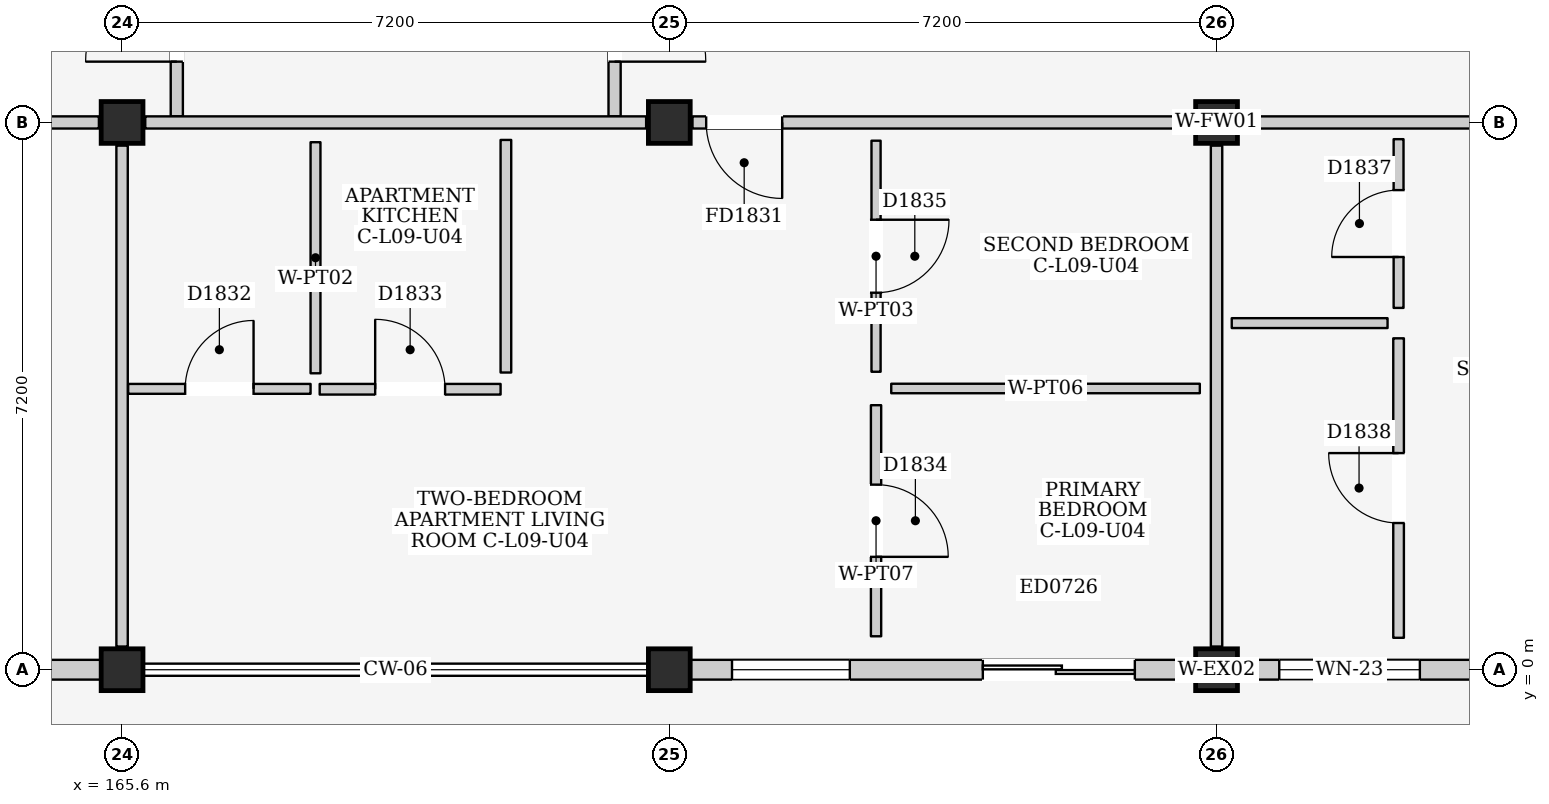
"""IFC4 building model, lengths in metres.
Left out: names, types, materials, properties, quantities, classifications, styles, units other than length and angle.
Written with IfcOpenShell. Run it as: python <this file> out.ifc"""

import sys

from ifc_helpers import new_model, si_unit, direction, frame, frame_2d, origin, origin_2d, place, context, subcontext, project, spatial, rectangle, extrude, element, fill, save


model = new_model("IFC4")
c1 = context("Model", 3, precision=1e-05, world=origin(), true_north=direction((0.0, 1.0)))
c2 = subcontext(c1, "Body", "Model", "MODEL_VIEW")
j1 = project(units=[si_unit("LENGTHUNIT", "METRE"), si_unit("PLANEANGLEUNIT", "RADIAN")], contexts=[c1])
p1 = place(None, origin())
s1 = spatial("IfcSite", under=j1, at=p1, CompositionType="ELEMENT")
p2 = place(p1, origin())
s2 = spatial("IfcBuilding", under=s1, at=p2, CompositionType="ELEMENT")
p3 = place(p2, frame((0.0, 0.0, 31.5)))
s3 = spatial("IfcBuildingStorey", under=s2, at=p3, CompositionType="ELEMENT", Elevation=31.5)
for number, where, z_axis, x_axis in (
    (1, (165.6, 0.0, 0.0), (0.0, 0.0, 1.0), (1.0, 0.0, 0.0)),
    (2, (165.6, 7.2, 0.0), (0.0, 0.0, 1.0), (1.0, 0.0, 0.0)),
    (3, (172.8, 0.0, 0.0), (0.0, 0.0, 1.0), (1.0, 0.0, 0.0)),
    (4, (172.8, 7.2, 0.0), (0.0, 0.0, 1.0), (1.0, 0.0, 0.0)),
    (5, (180.0, 0.0, 0.0), (0.0, 0.0, 1.0), (1.0, 0.0, 0.0)),
    (6, (180.0, 7.2, 0.0), (0.0, 0.0, 1.0), (1.0, 0.0, 0.0)),
):
    element("IfcColumn", number, at=place(p3, frame(where, z_axis=z_axis, x_axis=x_axis)), inside=s3, PredefinedType="COLUMN", context=c2, shape_type="SweptSolid", body=[
        extrude(rectangle(XDim=0.55, YDim=0.55, at=origin_2d()), origin(), (0.0, 0.0, 1.0), 3.3),
    ])
p4 = place(p3, frame((158.675, 0.0, 0.0), z_axis=(0.0, 0.0, 1.0), x_axis=(1.0, 0.0, 0.0)))
e7 = element("IfcWall", 7, at=p4, inside=s3, PredefinedType="ELEMENTEDWALL", context=c2, shape_type="SweptSolid", body=[
    extrude(rectangle(XDim=6.65, YDim=0.26, at=frame_2d((3.325, 0.0))), origin(), (0.0, 0.0, 1.0), 2.615),
])
p5 = place(p4, frame((3.85, 0.0, 0.0)))
e8 = element("IfcOpeningElement", 8, at=p5, cuts=e7, PredefinedType="OPENING", context=c2, shape_type="SweptSolid", body=[
    extrude(rectangle(XDim=1.5, YDim=2.12, at=frame_2d((0.75, 1.06))), frame((0.0, 0.145, 0.0), z_axis=(0.0, -1.0, 0.0), x_axis=(1.0, 0.0, 0.0)), (0.0, 0.0, 1.0), 0.29),
])
p6 = place(p4, frame((0.55, 0.0, 0.9)))
e9 = element("IfcOpeningElement", 9, at=p6, cuts=e7, PredefinedType="OPENING", context=c2, shape_type="SweptSolid", body=[
    extrude(rectangle(XDim=1.15, YDim=1.15, at=frame_2d((0.575, 0.575))), frame((0.0, 0.145, 0.0), z_axis=(0.0, -1.0, 0.0), x_axis=(1.0, 0.0, 0.0)), (0.0, 0.0, 1.0), 0.29),
])
p7 = place(p3, frame((173.075, 0.0, 0.0), z_axis=(0.0, 0.0, 1.0), x_axis=(1.0, 0.0, 0.0)))
e10 = element("IfcWall", 10, at=p7, inside=s3, PredefinedType="ELEMENTEDWALL", context=c2, shape_type="SweptSolid", body=[
    extrude(rectangle(XDim=6.65, YDim=0.26, at=frame_2d((3.325, 0.0))), origin(), (0.0, 0.0, 1.0), 2.615),
])
p8 = place(p7, frame((3.85, 0.0, 0.0)))
e11 = element("IfcOpeningElement", 11, at=p8, cuts=e10, PredefinedType="OPENING", context=c2, shape_type="SweptSolid", body=[
    extrude(rectangle(XDim=2.0, YDim=2.12, at=frame_2d((1.0, 1.06))), frame((0.0, 0.145, 0.0), z_axis=(0.0, -1.0, 0.0), x_axis=(1.0, 0.0, 0.0)), (0.0, 0.0, 1.0), 0.29),
])
p9 = place(p7, frame((0.55, 0.0, 0.9)))
e12 = element("IfcOpeningElement", 12, at=p9, cuts=e10, PredefinedType="OPENING", context=c2, shape_type="SweptSolid", body=[
    extrude(rectangle(XDim=1.55, YDim=1.45, at=frame_2d((0.775, 0.725))), frame((0.0, 0.145, 0.0), z_axis=(0.0, -1.0, 0.0), x_axis=(1.0, 0.0, 0.0)), (0.0, 0.0, 1.0), 0.29),
])
p10 = place(p3, frame((180.275, 0.0, 0.0), z_axis=(0.0, 0.0, 1.0), x_axis=(1.0, 0.0, 0.0)))
e13 = element("IfcWall", 13, at=p10, inside=s3, PredefinedType="ELEMENTEDWALL", context=c2, shape_type="SweptSolid", body=[
    extrude(rectangle(XDim=6.65, YDim=0.26, at=frame_2d((3.325, 0.0))), origin(), (0.0, 0.0, 1.0), 2.615),
])
p11 = place(p10, frame((3.85, 0.0, 0.0)))
e14 = element("IfcOpeningElement", 14, at=p11, cuts=e13, PredefinedType="OPENING", context=c2, shape_type="SweptSolid", body=[
    extrude(rectangle(XDim=1.4, YDim=2.1, at=frame_2d((0.7, 1.05))), frame((0.0, 0.145, 0.0), z_axis=(0.0, -1.0, 0.0), x_axis=(1.0, 0.0, 0.0)), (0.0, 0.0, 1.0), 0.29),
])
p12 = place(p10, frame((0.55, 0.0, 0.9)))
e15 = element("IfcOpeningElement", 15, at=p12, cuts=e13, PredefinedType="OPENING", context=c2, shape_type="SweptSolid", body=[
    extrude(rectangle(XDim=1.85, YDim=1.4, at=frame_2d((0.925, 0.7))), frame((0.0, 0.145, 0.0), z_axis=(0.0, -1.0, 0.0), x_axis=(1.0, 0.0, 0.0)), (0.0, 0.0, 1.0), 0.29),
])
p13 = place(p3, frame((166.32, 7.28, 0.0), z_axis=(0.0, 0.0, 1.0), x_axis=(0.0, 1.0, 0.0)))
e16 = element("IfcWall", 16, at=p13, inside=s3, PredefinedType="PARTITIONING", context=c2, shape_type="SweptSolid", body=[
    extrude(rectangle(XDim=4.32, YDim=0.16, at=frame_2d((2.16, 0.0))), origin(), (0.0, 0.0, 1.0), 3.08),
])
p14 = place(p13, frame((0.72, 0.0, 0.0)))
e17 = element("IfcOpeningElement", 17, at=p14, cuts=e16, PredefinedType="OPENING", context=c2, shape_type="SweptSolid", body=[
    extrude(rectangle(XDim=1.2, YDim=2.2, at=frame_2d((0.6, 1.1))), frame((0.0, 0.095, 0.0), z_axis=(0.0, -1.0, 0.0), x_axis=(1.0, 0.0, 0.0)), (0.0, 0.0, 1.0), 0.19),
])
p15 = place(p3, frame((172.08, 7.28, 0.0), z_axis=(0.0, 0.0, 1.0), x_axis=(0.0, 1.0, 0.0)))
e18 = element("IfcWall", 18, at=p15, inside=s3, PredefinedType="PARTITIONING", context=c2, shape_type="SweptSolid", body=[
    extrude(rectangle(XDim=4.32, YDim=0.16, at=frame_2d((2.16, 0.0))), origin(), (0.0, 0.0, 1.0), 3.08),
])
p16 = place(p15, frame((0.72, 0.0, 0.0)))
e19 = element("IfcOpeningElement", 19, at=p16, cuts=e18, PredefinedType="OPENING", context=c2, shape_type="SweptSolid", body=[
    extrude(rectangle(XDim=1.2, YDim=2.2, at=frame_2d((0.6, 1.1))), frame((0.0, 0.095, 0.0), z_axis=(0.0, -1.0, 0.0), x_axis=(1.0, 0.0, 0.0)), (0.0, 0.0, 1.0), 0.19),
])
p17 = place(p3, frame((158.705, 7.2, 0.0), z_axis=(0.0, 0.0, 1.0), x_axis=(1.0, 0.0, 0.0)))
e20 = element("IfcWall", 20, at=p17, inside=s3, PredefinedType="PARTITIONING", context=c2, shape_type="SweptSolid", body=[
    extrude(rectangle(XDim=6.59, YDim=0.16, at=frame_2d((3.295, 0.0))), origin(), (0.0, 0.0, 1.0), 2.465),
])
p18 = place(p17, frame((4.145, 0.0, 0.0)))
e21 = element("IfcOpeningElement", 21, at=p18, cuts=e20, PredefinedType="OPENING", context=c2, shape_type="SweptSolid", body=[
    extrude(rectangle(XDim=1.0, YDim=2.15, at=frame_2d((0.5, 1.075))), frame((0.0, 0.095, 0.0), z_axis=(0.0, -1.0, 0.0), x_axis=(1.0, 0.0, 0.0)), (0.0, 0.0, 1.0), 0.19),
])
p19 = place(p3, frame((165.6, 0.305, 0.0), z_axis=(0.0, 0.0, 1.0), x_axis=(0.0, 1.0, 0.0)))
e22 = element("IfcWall", 22, at=p19, inside=s3, PredefinedType="PARTITIONING", context=c2, shape_type="SweptSolid", body=[
    extrude(rectangle(XDim=6.59, YDim=0.15, at=frame_2d((3.295, 0.0))), origin(), (0.0, 0.0, 1.0), 2.565),
])
p20 = place(p3, frame((165.905, 7.2, 0.0), z_axis=(0.0, 0.0, 1.0), x_axis=(1.0, 0.0, 0.0)))
e23 = element("IfcWall", 23, at=p20, inside=s3, PredefinedType="PARTITIONING", context=c2, shape_type="SweptSolid", body=[
    extrude(rectangle(XDim=6.59, YDim=0.16, at=frame_2d((3.295, 0.0))), origin(), (0.0, 0.0, 1.0), 2.465),
])
p21 = place(p3, frame((173.105, 7.2, 0.0), z_axis=(0.0, 0.0, 1.0), x_axis=(1.0, 0.0, 0.0)))
e24 = element("IfcWall", 24, at=p21, inside=s3, PredefinedType="PARTITIONING", context=c2, shape_type="SweptSolid", body=[
    extrude(rectangle(XDim=6.59, YDim=0.16, at=frame_2d((3.295, 0.0))), origin(), (0.0, 0.0, 1.0), 2.465),
])
p22 = place(p21, frame((0.18, 0.0, 0.0)))
e25 = element("IfcOpeningElement", 25, at=p22, cuts=e24, PredefinedType="OPENING", context=c2, shape_type="SweptSolid", body=[
    extrude(rectangle(XDim=1.0, YDim=2.15, at=frame_2d((0.5, 1.075))), frame((0.0, 0.095, 0.0), z_axis=(0.0, -1.0, 0.0), x_axis=(1.0, 0.0, 0.0)), (0.0, 0.0, 1.0), 0.19),
])
p23 = place(p3, frame((180.0, 0.305, 0.0), z_axis=(0.0, 0.0, 1.0), x_axis=(0.0, 1.0, 0.0)))
e26 = element("IfcWall", 26, at=p23, inside=s3, PredefinedType="PARTITIONING", context=c2, shape_type="SweptSolid", body=[
    extrude(rectangle(XDim=6.59, YDim=0.15, at=frame_2d((3.295, 0.0))), origin(), (0.0, 0.0, 1.0), 2.565),
])
p24 = place(p3, frame((165.68, 3.695, 0.0), z_axis=(0.0, 0.0, 1.0), x_axis=(1.0, 0.0, 0.0)))
e27 = element("IfcWall", 27, at=p24, inside=s3, PredefinedType="PARTITIONING", context=c2, shape_type="SweptSolid", body=[
    extrude(rectangle(XDim=2.4, YDim=0.13, at=frame_2d((1.2, 0.0))), origin(), (0.0, 0.0, 1.0), 3.08),
])
p25 = place(p24, frame((0.75, 0.0, 0.0)))
e28 = element("IfcOpeningElement", 28, at=p25, cuts=e27, PredefinedType="OPENING", context=c2, shape_type="SweptSolid", body=[
    extrude(rectangle(XDim=0.9, YDim=2.1, at=frame_2d((0.45, 1.05))), frame((0.0, 0.08, 0.0), z_axis=(0.0, -1.0, 0.0), x_axis=(1.0, 0.0, 0.0)), (0.0, 0.0, 1.0), 0.16),
])
p26 = place(p3, frame((168.145, 3.9, 0.0), z_axis=(0.0, 0.0, 1.0), x_axis=(0.0, 1.0, 0.0)))
e29 = element("IfcWall", 29, at=p26, inside=s3, PredefinedType="PARTITIONING", context=c2, shape_type="SweptSolid", body=[
    extrude(rectangle(XDim=3.04, YDim=0.13, at=frame_2d((1.52, 0.0))), origin(), (0.0, 0.0, 1.0), 3.08),
])
p27 = place(p3, frame((168.2, 3.69, 0.0), z_axis=(0.0, 0.0, 1.0), x_axis=(1.0, 0.0, 0.0)))
e30 = element("IfcWall", 30, at=p27, inside=s3, PredefinedType="PARTITIONING", context=c2, shape_type="SweptSolid", body=[
    extrude(rectangle(XDim=2.38, YDim=0.14, at=frame_2d((1.19, 0.0))), origin(), (0.0, 0.0, 1.0), 3.08),
])
p28 = place(p27, frame((0.73, 0.0, 0.0)))
e31 = element("IfcOpeningElement", 31, at=p28, cuts=e30, PredefinedType="OPENING", context=c2, shape_type="SweptSolid", body=[
    extrude(rectangle(XDim=0.92, YDim=2.1, at=frame_2d((0.46, 1.05))), frame((0.0, 0.085, 0.0), z_axis=(0.0, -1.0, 0.0), x_axis=(1.0, 0.0, 0.0)), (0.0, 0.0, 1.0), 0.17),
])
p29 = place(p3, frame((170.65, 3.91, 0.0), z_axis=(0.0, 0.0, 1.0), x_axis=(0.0, 1.0, 0.0)))
e32 = element("IfcWall", 32, at=p29, inside=s3, PredefinedType="PARTITIONING", context=c2, shape_type="SweptSolid", body=[
    extrude(rectangle(XDim=3.06, YDim=0.14, at=frame_2d((1.53, 0.0))), origin(), (0.0, 0.0, 1.0), 3.08),
])
p30 = place(p3, frame((175.52, 0.44, 0.0), z_axis=(0.0, 0.0, 1.0), x_axis=(0.0, 1.0, 0.0)))
e33 = element("IfcWall", 33, at=p30, inside=s3, PredefinedType="PARTITIONING", context=c2, shape_type="SweptSolid", body=[
    extrude(rectangle(XDim=3.04, YDim=0.135, at=frame_2d((1.52, 0.0))), origin(), (0.0, 0.0, 1.0), 3.08),
])
p31 = place(p30, frame((1.045, 0.0, 0.0)))
e34 = element("IfcOpeningElement", 34, at=p31, cuts=e33, PredefinedType="OPENING", context=c2, shape_type="SweptSolid", body=[
    extrude(rectangle(XDim=0.95, YDim=2.15, at=frame_2d((0.475, 1.075))), frame((0.0, 0.083, 0.0), z_axis=(0.0, -1.0, 0.0), x_axis=(1.0, 0.0, 0.0)), (0.0, 0.0, 1.0), 0.165),
])
p32 = place(p3, frame((175.72, 3.7, 0.0), z_axis=(0.0, 0.0, 1.0), x_axis=(1.0, 0.0, 0.0)))
e35 = element("IfcWall", 35, at=p32, inside=s3, PredefinedType="PARTITIONING", context=c2, shape_type="SweptSolid", body=[
    extrude(rectangle(XDim=4.06, YDim=0.125, at=frame_2d((2.03, 0.0))), origin(), (0.0, 0.0, 1.0), 3.08),
])
p33 = place(p3, frame((175.52, 3.92, 0.0), z_axis=(0.0, 0.0, 1.0), x_axis=(0.0, 1.0, 0.0)))
e36 = element("IfcWall", 36, at=p33, inside=s3, PredefinedType="PARTITIONING", context=c2, shape_type="SweptSolid", body=[
    extrude(rectangle(XDim=3.04, YDim=0.12, at=frame_2d((1.52, 0.0))), origin(), (0.0, 0.0, 1.0), 3.08),
])
p34 = place(p33, frame((1.04, 0.0, 0.0)))
e37 = element("IfcOpeningElement", 37, at=p34, cuts=e36, PredefinedType="OPENING", context=c2, shape_type="SweptSolid", body=[
    extrude(rectangle(XDim=0.96, YDim=2.15, at=frame_2d((0.48, 1.075))), frame((0.0, 0.075, 0.0), z_axis=(0.0, -1.0, 0.0), x_axis=(1.0, 0.0, 0.0)), (0.0, 0.0, 1.0), 0.15),
])
p35 = place(p3, frame((180.305, 7.2, 0.0), z_axis=(0.0, 0.0, 1.0), x_axis=(1.0, 0.0, 0.0)))
e38 = element("IfcWall", 38, at=p35, inside=s3, PredefinedType="PARTITIONING", context=c2, shape_type="SweptSolid", body=[
    extrude(rectangle(XDim=6.59, YDim=0.16, at=frame_2d((3.295, 0.0))), origin(), (0.0, 0.0, 1.0), 2.465),
])
p36 = place(p35, frame((4.145, 0.0, 0.0)))
e39 = element("IfcOpeningElement", 39, at=p36, cuts=e38, PredefinedType="OPENING", context=c2, shape_type="SweptSolid", body=[
    extrude(rectangle(XDim=1.0, YDim=2.15, at=frame_2d((0.5, 1.075))), frame((0.0, 0.095, 0.0), z_axis=(0.0, -1.0, 0.0), x_axis=(1.0, 0.0, 0.0)), (0.0, 0.0, 1.0), 0.19),
])
p37 = place(p3, frame((180.2, 4.56, 0.0), z_axis=(0.0, 0.0, 1.0), x_axis=(1.0, 0.0, 0.0)))
e40 = element("IfcWall", 40, at=p37, inside=s3, PredefinedType="PARTITIONING", context=c2, shape_type="SweptSolid", body=[
    extrude(rectangle(XDim=2.05, YDim=0.13, at=frame_2d((1.025, 0.0))), origin(), (0.0, 0.0, 1.0), 3.08),
])
p38 = place(p3, frame((182.395, 4.76, 0.0), z_axis=(0.0, 0.0, 1.0), x_axis=(0.0, 1.0, 0.0)))
e41 = element("IfcWall", 41, at=p38, inside=s3, PredefinedType="PARTITIONING", context=c2, shape_type="SweptSolid", body=[
    extrude(rectangle(XDim=2.22, YDim=0.13, at=frame_2d((1.11, 0.0))), origin(), (0.0, 0.0, 1.0), 3.08),
])
p39 = place(p38, frame((0.67, 0.0, 0.0)))
e42 = element("IfcOpeningElement", 42, at=p39, cuts=e41, PredefinedType="OPENING", context=c2, shape_type="SweptSolid", body=[
    extrude(rectangle(XDim=0.88, YDim=2.1, at=frame_2d((0.44, 1.05))), frame((0.0, 0.08, 0.0), z_axis=(0.0, -1.0, 0.0), x_axis=(1.0, 0.0, 0.0)), (0.0, 0.0, 1.0), 0.16),
])
p40 = place(p3, frame((182.395, 0.42, 0.0), z_axis=(0.0, 0.0, 1.0), x_axis=(0.0, 1.0, 0.0)))
e43 = element("IfcWall", 43, at=p40, inside=s3, PredefinedType="PARTITIONING", context=c2, shape_type="SweptSolid", body=[
    extrude(rectangle(XDim=3.94, YDim=0.14, at=frame_2d((1.97, 0.0))), origin(), (0.0, 0.0, 1.0), 3.08),
])
p41 = place(p40, frame((1.51, 0.0, 0.0)))
e44 = element("IfcOpeningElement", 44, at=p41, cuts=e43, PredefinedType="OPENING", context=c2, shape_type="SweptSolid", body=[
    extrude(rectangle(XDim=0.92, YDim=2.1, at=frame_2d((0.46, 1.05))), frame((0.0, 0.085, 0.0), z_axis=(0.0, -1.0, 0.0), x_axis=(1.0, 0.0, 0.0)), (0.0, 0.0, 1.0), 0.17),
])
p42 = place(p8, frame((2.0, 0.0, 0.0), z_axis=(0.0, 0.0, 1.0), x_axis=(-1.0, 0.0, 0.0)))
e45 = element("IfcDoor", 45, at=p42, inside=s3, OperationType="DOUBLE_DOOR_SLIDING", PredefinedType="DOOR", context=c2, shape_type="SweptSolid", body=[
    extrude(rectangle(XDim=2.0, YDim=2.12, at=frame_2d((1.0, 1.06))), frame((0.0, 0.025, 0.0), z_axis=(0.0, -1.0, 0.0), x_axis=(1.0, 0.0, 0.0)), (0.0, 0.0, 1.0), 0.05),
])
fill(e11, e45)
p43 = place(p9, origin())
e46 = element("IfcWindow", 46, at=p43, inside=s3, PartitioningType="DOUBLE_PANEL_VERTICAL", PredefinedType="WINDOW", context=c2, shape_type="SweptSolid", body=[
    extrude(rectangle(XDim=1.55, YDim=1.45, at=frame_2d((0.775, 0.725))), frame((0.0, 0.03, 0.0), z_axis=(0.0, -1.0, 0.0), x_axis=(1.0, 0.0, 0.0)), (0.0, 0.0, 1.0), 0.06),
])
fill(e12, e46)
p44 = place(p12, origin())
e47 = element("IfcWindow", 47, at=p44, inside=s3, PartitioningType="DOUBLE_PANEL_VERTICAL", PredefinedType="WINDOW", context=c2, shape_type="SweptSolid", body=[
    extrude(rectangle(XDim=1.85, YDim=1.4, at=frame_2d((0.925, 0.7))), frame((0.0, 0.03, 0.0), z_axis=(0.0, -1.0, 0.0), x_axis=(1.0, 0.0, 0.0)), (0.0, 0.0, 1.0), 0.06),
])
fill(e15, e47)
p45 = place(p14, origin())
e48 = element("IfcDoor", 48, at=p45, inside=s3, OperationType="SINGLE_SWING_LEFT", PredefinedType="DOOR", context=c2, shape_type="SweptSolid", body=[
    extrude(rectangle(XDim=1.2, YDim=2.2, at=frame_2d((0.6, 1.1))), frame((0.0, 0.025, 0.0), z_axis=(0.0, -1.0, 0.0), x_axis=(1.0, 0.0, 0.0)), (0.0, 0.0, 1.0), 0.05),
])
fill(e17, e48)
p46 = place(p16, frame((1.2, 0.0, 0.0), z_axis=(0.0, 0.0, 1.0), x_axis=(-1.0, 0.0, 0.0)))
e49 = element("IfcDoor", 49, at=p46, inside=s3, OperationType="SINGLE_SWING_RIGHT", PredefinedType="DOOR", context=c2, shape_type="SweptSolid", body=[
    extrude(rectangle(XDim=1.2, YDim=2.2, at=frame_2d((0.6, 1.1))), frame((0.0, 0.025, 0.0), z_axis=(0.0, -1.0, 0.0), x_axis=(1.0, 0.0, 0.0)), (0.0, 0.0, 1.0), 0.05),
])
fill(e19, e49)
p47 = place(p22, frame((1.0, 0.0, 0.0), z_axis=(0.0, 0.0, 1.0), x_axis=(-1.0, 0.0, 0.0)))
e50 = element("IfcDoor", 50, at=p47, inside=s3, OperationType="SINGLE_SWING_LEFT", PredefinedType="DOOR", context=c2, shape_type="SweptSolid", body=[
    extrude(rectangle(XDim=1.0, YDim=2.15, at=frame_2d((0.5, 1.075))), frame((0.0, 0.025, 0.0), z_axis=(0.0, -1.0, 0.0), x_axis=(1.0, 0.0, 0.0)), (0.0, 0.0, 1.0), 0.05),
])
fill(e25, e50)
p48 = place(p25, origin())
e51 = element("IfcDoor", 51, at=p48, inside=s3, OperationType="SINGLE_SWING_RIGHT", PredefinedType="DOOR", context=c2, shape_type="SweptSolid", body=[
    extrude(rectangle(XDim=0.9, YDim=2.1, at=frame_2d((0.45, 1.05))), frame((0.0, 0.025, 0.0), z_axis=(0.0, -1.0, 0.0), x_axis=(1.0, 0.0, 0.0)), (0.0, 0.0, 1.0), 0.05),
])
fill(e28, e51)
p49 = place(p28, origin())
e52 = element("IfcDoor", 52, at=p49, inside=s3, OperationType="SINGLE_SWING_LEFT", PredefinedType="DOOR", context=c2, shape_type="SweptSolid", body=[
    extrude(rectangle(XDim=0.92, YDim=2.1, at=frame_2d((0.46, 1.05))), frame((0.0, 0.025, 0.0), z_axis=(0.0, -1.0, 0.0), x_axis=(1.0, 0.0, 0.0)), (0.0, 0.0, 1.0), 0.05),
])
fill(e31, e52)
p50 = place(p31, frame((0.95, 0.0, 0.0), z_axis=(0.0, 0.0, 1.0), x_axis=(-1.0, 0.0, 0.0)))
e53 = element("IfcDoor", 53, at=p50, inside=s3, OperationType="SINGLE_SWING_RIGHT", PredefinedType="DOOR", context=c2, shape_type="SweptSolid", body=[
    extrude(rectangle(XDim=0.95, YDim=2.15, at=frame_2d((0.475, 1.075))), frame((0.0, 0.025, 0.0), z_axis=(0.0, -1.0, 0.0), x_axis=(1.0, 0.0, 0.0)), (0.0, 0.0, 1.0), 0.05),
])
fill(e34, e53)
p51 = place(p34, frame((0.96, 0.0, 0.0), z_axis=(0.0, 0.0, 1.0), x_axis=(-1.0, 0.0, 0.0)))
e54 = element("IfcDoor", 54, at=p51, inside=s3, OperationType="SINGLE_SWING_LEFT", PredefinedType="DOOR", context=c2, shape_type="SweptSolid", body=[
    extrude(rectangle(XDim=0.96, YDim=2.15, at=frame_2d((0.48, 1.075))), frame((0.0, 0.025, 0.0), z_axis=(0.0, -1.0, 0.0), x_axis=(1.0, 0.0, 0.0)), (0.0, 0.0, 1.0), 0.05),
])
fill(e37, e54)
p52 = place(p39, origin())
e55 = element("IfcDoor", 55, at=p52, inside=s3, OperationType="SINGLE_SWING_LEFT", PredefinedType="DOOR", context=c2, shape_type="SweptSolid", body=[
    extrude(rectangle(XDim=0.88, YDim=2.1, at=frame_2d((0.44, 1.05))), frame((0.0, 0.025, 0.0), z_axis=(0.0, -1.0, 0.0), x_axis=(1.0, 0.0, 0.0)), (0.0, 0.0, 1.0), 0.05),
])
fill(e42, e55)
p53 = place(p41, origin())
e56 = element("IfcDoor", 56, at=p53, inside=s3, OperationType="SINGLE_SWING_RIGHT", PredefinedType="DOOR", context=c2, shape_type="SweptSolid", body=[
    extrude(rectangle(XDim=0.92, YDim=2.1, at=frame_2d((0.46, 1.05))), frame((0.0, 0.025, 0.0), z_axis=(0.0, -1.0, 0.0), x_axis=(1.0, 0.0, 0.0)), (0.0, 0.0, 1.0), 0.05),
])
fill(e44, e56)
save(model, sys.argv[1])
